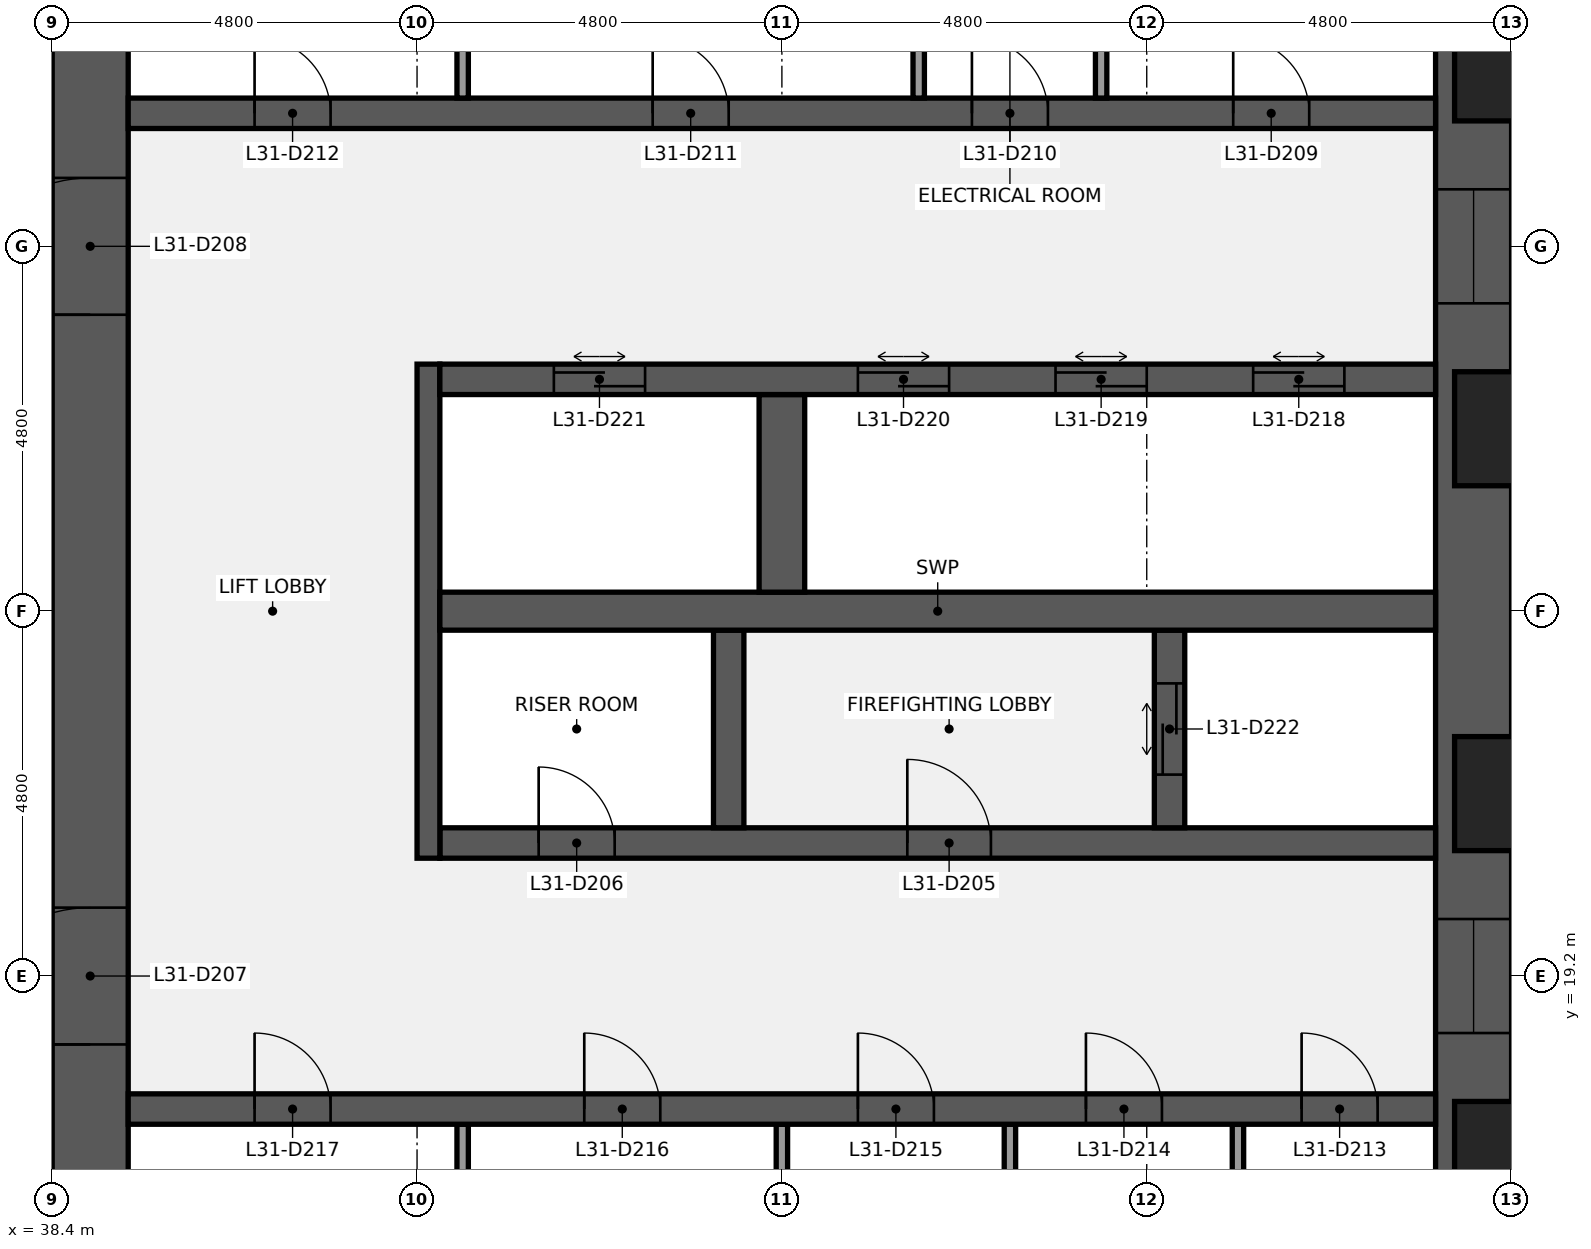
"""IFC4 building model, lengths in metres.
Left out: names, types, materials, properties, quantities, classifications, styles, units other than length and angle.
Written with IfcOpenShell. Run it as: python <this file> out.ifc"""

import sys

from ifc_helpers import new_model, si_unit, direction, frame, frame_2d, origin, place, context, subcontext, project, spatial, rectangle, extrude, element, fill, save


model = new_model("IFC4")
c1 = context("Model", 3, precision=1e-05, world=origin(), true_north=direction((0.0, 1.0)))
c2 = subcontext(c1, "Body", "Model", "MODEL_VIEW")
j1 = project(units=[si_unit("LENGTHUNIT", "METRE"), si_unit("PLANEANGLEUNIT", "RADIAN")], contexts=[c1])
p1 = place(None, origin())
s1 = spatial("IfcSite", under=j1, at=p1, CompositionType="ELEMENT")
p2 = place(p1, origin())
s2 = spatial("IfcBuilding", under=s1, at=p2, CompositionType="ELEMENT")
p3 = place(p2, frame((0.0, 0.0, 144.1)))
s3 = spatial("IfcBuildingStorey", under=s2, at=p3, CompositionType="ELEMENT", Elevation=144.1)
p4 = place(p3, frame((57.1, 38.4, 0.0), z_axis=(0.0, 0.0, 1.0), x_axis=(0.0, -1.0, 0.0)))
e1 = element("IfcWall", 1, at=p4, inside=s3, PredefinedType="SHEAR", context=c2, shape_type="SweptSolid", body=[
    extrude(rectangle(XDim=28.8, YDim=1.0, at=frame_2d((14.4, 0.0))), origin(), (0.0, 0.0, 1.0), 3.84),
])
p5 = place(p4, frame((18.45, 0.0, 0.9)))
e2 = element("IfcOpeningElement", 2, at=p5, cuts=e1, PredefinedType="OPENING", context=c2, shape_type="SweptSolid", body=[
    extrude(rectangle(XDim=1.5, YDim=1.5, at=frame_2d((0.75, 0.75))), frame((0.0, 0.51, 0.0), z_axis=(0.0, -1.0, 0.0), x_axis=(1.0, 0.0, 0.0)), (0.0, 0.0, 1.0), 1.02),
])
p6 = place(p4, frame((8.85, 0.0, 0.9)))
e3 = element("IfcOpeningElement", 3, at=p6, cuts=e1, PredefinedType="OPENING", context=c2, shape_type="SweptSolid", body=[
    extrude(rectangle(XDim=1.5, YDim=1.5, at=frame_2d((0.75, 0.75))), frame((0.0, 0.51, 0.0), z_axis=(0.0, -1.0, 0.0), x_axis=(1.0, 0.0, 0.0)), (0.0, 0.0, 1.0), 1.02),
])
p7 = place(p3, frame((38.9, 9.6, 0.0), z_axis=(0.0, 0.0, 1.0), x_axis=(0.0, 1.0, 0.0)))
e4 = element("IfcWall", 4, at=p7, inside=s3, PredefinedType="SHEAR", context=c2, shape_type="SweptSolid", body=[
    extrude(rectangle(XDim=28.8, YDim=1.0, at=frame_2d((14.4, 0.0))), origin(), (0.0, 0.0, 1.0), 3.84),
])
p8 = place(p7, frame((8.7, 0.0, 0.0)))
e5 = element("IfcOpeningElement", 5, at=p8, cuts=e4, PredefinedType="OPENING", context=c2, shape_type="SweptSolid", body=[
    extrude(rectangle(XDim=1.8, YDim=2.1, at=frame_2d((0.9, 1.05))), frame((0.0, 0.51, 0.0), z_axis=(0.0, -1.0, 0.0), x_axis=(1.0, 0.0, 0.0)), (0.0, 0.0, 1.0), 1.02),
])
p9 = place(p7, frame((18.3, 0.0, 0.0)))
e6 = element("IfcOpeningElement", 6, at=p9, cuts=e4, PredefinedType="OPENING", context=c2, shape_type="SweptSolid", body=[
    extrude(rectangle(XDim=1.8, YDim=2.1, at=frame_2d((0.9, 1.05))), frame((0.0, 0.51, 0.0), z_axis=(0.0, -1.0, 0.0), x_axis=(1.0, 0.0, 0.0)), (0.0, 0.0, 1.0), 1.02),
])
for number, where, z_axis, x_axis in (
    (7, (54.0, 14.65, 0.0), (0.0, 0.0, 1.0), (0.0, 1.0, 0.0)),
    (8, (51.0, 14.65, 0.0), (0.0, 0.0, 1.0), (0.0, 1.0, 0.0)),
    (9, (48.0, 14.65, 0.0), (0.0, 0.0, 1.0), (0.0, 1.0, 0.0)),
    (10, (43.8, 14.65, 0.0), (0.0, 0.0, 1.0), (0.0, 1.0, 0.0)),
):
    element("IfcWall", number, at=place(p3, frame(where, z_axis=z_axis, x_axis=x_axis)), inside=s3, PredefinedType="PARTITIONING", context=c2, shape_type="SweptSolid", body=[
        extrude(rectangle(XDim=2.6, YDim=0.15, at=frame_2d((1.3, 0.0))), origin(), (0.0, 0.0, 1.0), 3.84),
    ])
p10 = place(p3, frame((39.4, 17.45, 0.0), z_axis=(0.0, 0.0, 1.0), x_axis=(1.0, 0.0, 0.0)))
e11 = element("IfcWall", 11, at=p10, inside=s3, PredefinedType="SHEAR", context=c2, shape_type="SweptSolid", body=[
    extrude(rectangle(XDim=17.2, YDim=0.4, at=frame_2d((8.6, 0.0))), origin(), (0.0, 0.0, 1.0), 3.84),
])
p11 = place(p10, frame((15.438, 0.0, 0.0)))
e12 = element("IfcOpeningElement", 12, at=p11, cuts=e11, PredefinedType="OPENING", context=c2, shape_type="SweptSolid", body=[
    extrude(rectangle(XDim=1.0, YDim=2.1, at=frame_2d((0.5, 1.05))), frame((0.0, 0.21, 0.0), z_axis=(0.0, -1.0, 0.0), x_axis=(1.0, 0.0, 0.0)), (0.0, 0.0, 1.0), 0.42),
])
p12 = place(p10, frame((12.6, 0.0, 0.0)))
e13 = element("IfcOpeningElement", 13, at=p12, cuts=e11, PredefinedType="OPENING", context=c2, shape_type="SweptSolid", body=[
    extrude(rectangle(XDim=1.0, YDim=2.1, at=frame_2d((0.5, 1.05))), frame((0.0, 0.21, 0.0), z_axis=(0.0, -1.0, 0.0), x_axis=(1.0, 0.0, 0.0)), (0.0, 0.0, 1.0), 0.42),
])
p13 = place(p10, frame((9.6, 0.0, 0.0)))
e14 = element("IfcOpeningElement", 14, at=p13, cuts=e11, PredefinedType="OPENING", context=c2, shape_type="SweptSolid", body=[
    extrude(rectangle(XDim=1.0, YDim=2.1, at=frame_2d((0.5, 1.05))), frame((0.0, 0.21, 0.0), z_axis=(0.0, -1.0, 0.0), x_axis=(1.0, 0.0, 0.0)), (0.0, 0.0, 1.0), 0.42),
])
p14 = place(p10, frame((6.0, 0.0, 0.0)))
e15 = element("IfcOpeningElement", 15, at=p14, cuts=e11, PredefinedType="OPENING", context=c2, shape_type="SweptSolid", body=[
    extrude(rectangle(XDim=1.0, YDim=2.1, at=frame_2d((0.5, 1.05))), frame((0.0, 0.21, 0.0), z_axis=(0.0, -1.0, 0.0), x_axis=(1.0, 0.0, 0.0)), (0.0, 0.0, 1.0), 0.42),
])
p15 = place(p10, frame((1.663, 0.0, 0.0)))
e16 = element("IfcOpeningElement", 16, at=p15, cuts=e11, PredefinedType="OPENING", context=c2, shape_type="SweptSolid", body=[
    extrude(rectangle(XDim=1.0, YDim=2.1, at=frame_2d((0.5, 1.05))), frame((0.0, 0.21, 0.0), z_axis=(0.0, -1.0, 0.0), x_axis=(1.0, 0.0, 0.0)), (0.0, 0.0, 1.0), 0.42),
])
p16 = place(p3, frame((43.5, 20.95, 0.0), z_axis=(0.0, 0.0, 1.0), x_axis=(1.0, 0.0, 0.0)))
e17 = element("IfcWall", 17, at=p16, inside=s3, PredefinedType="SHEAR", context=c2, shape_type="SweptSolid", body=[
    extrude(rectangle(XDim=13.1, YDim=0.4, at=frame_2d((6.55, 0.0))), origin(), (0.0, 0.0, 1.0), 3.84),
])
p17 = place(p16, frame((6.15, 0.0, 0.0)))
e18 = element("IfcOpeningElement", 18, at=p17, cuts=e17, PredefinedType="OPENING", context=c2, shape_type="SweptSolid", body=[
    extrude(rectangle(XDim=1.1, YDim=2.1, at=frame_2d((0.55, 1.05))), frame((0.0, 0.21, 0.0), z_axis=(0.0, -1.0, 0.0), x_axis=(1.0, 0.0, 0.0)), (0.0, 0.0, 1.0), 0.42),
])
p18 = place(p16, frame((1.3, 0.0, 0.0)))
e19 = element("IfcOpeningElement", 19, at=p18, cuts=e17, PredefinedType="OPENING", context=c2, shape_type="SweptSolid", body=[
    extrude(rectangle(XDim=1.0, YDim=2.1, at=frame_2d((0.5, 1.05))), frame((0.0, 0.21, 0.0), z_axis=(0.0, -1.0, 0.0), x_axis=(1.0, 0.0, 0.0)), (0.0, 0.0, 1.0), 0.42),
])
p19 = place(p3, frame((43.35, 20.75, 0.0), z_axis=(0.0, 0.0, 1.0), x_axis=(0.0, 1.0, 0.0)))
e20 = element("IfcWall", 20, at=p19, inside=s3, PredefinedType="SHEAR", context=c2, shape_type="SweptSolid", body=[
    extrude(rectangle(XDim=6.5, YDim=0.3, at=frame_2d((3.25, 0.0))), origin(), (0.0, 0.0, 1.0), 3.84),
])
p20 = place(p3, frame((53.1, 21.15, 0.0), z_axis=(0.0, 0.0, 1.0), x_axis=(0.0, 1.0, 0.0)))
e21 = element("IfcWall", 21, at=p20, inside=s3, PredefinedType="SHEAR", context=c2, shape_type="SweptSolid", body=[
    extrude(rectangle(XDim=2.6, YDim=0.4, at=frame_2d((1.3, 0.0))), origin(), (0.0, 0.0, 1.0), 3.84),
])
p21 = place(p20, frame((0.7, 0.0, 0.0)))
e22 = element("IfcOpeningElement", 22, at=p21, cuts=e21, PredefinedType="OPENING", context=c2, shape_type="SweptSolid", body=[
    extrude(rectangle(XDim=1.2, YDim=2.1, at=frame_2d((0.6, 1.05))), frame((0.0, 0.21, 0.0), z_axis=(0.0, -1.0, 0.0), x_axis=(1.0, 0.0, 0.0)), (0.0, 0.0, 1.0), 0.42),
])
p22 = place(p3, frame((47.3, 21.15, 0.0), z_axis=(0.0, 0.0, 1.0), x_axis=(0.0, 1.0, 0.0)))
e23 = element("IfcWall", 23, at=p22, inside=s3, PredefinedType="SHEAR", context=c2, shape_type="SweptSolid", body=[
    extrude(rectangle(XDim=2.6, YDim=0.4, at=frame_2d((1.3, 0.0))), origin(), (0.0, 0.0, 1.0), 3.84),
])
p23 = place(p3, frame((43.5, 24.0, 0.0), z_axis=(0.0, 0.0, 1.0), x_axis=(1.0, 0.0, 0.0)))
e24 = element("IfcWall", 24, at=p23, inside=s3, PredefinedType="SHEAR", context=c2, shape_type="SweptSolid", body=[
    extrude(rectangle(XDim=13.1, YDim=0.5, at=frame_2d((6.55, 0.0))), origin(), (0.0, 0.0, 1.0), 3.84),
])
p24 = place(p3, frame((48.0, 24.25, 0.0), z_axis=(0.0, 0.0, 1.0), x_axis=(0.0, 1.0, 0.0)))
e25 = element("IfcWall", 25, at=p24, inside=s3, PredefinedType="SHEAR", context=c2, shape_type="SweptSolid", body=[
    extrude(rectangle(XDim=2.6, YDim=0.6, at=frame_2d((1.3, 0.0))), origin(), (0.0, 0.0, 1.0), 3.84),
])
p25 = place(p3, frame((43.5, 27.05, 0.0), z_axis=(0.0, 0.0, 1.0), x_axis=(1.0, 0.0, 0.0)))
e26 = element("IfcWall", 26, at=p25, inside=s3, PredefinedType="SHEAR", context=c2, shape_type="SweptSolid", body=[
    extrude(rectangle(XDim=13.1, YDim=0.4, at=frame_2d((6.55, 0.0))), origin(), (0.0, 0.0, 1.0), 3.84),
])
p26 = place(p25, frame((10.7, 0.0, 0.0)))
e27 = element("IfcOpeningElement", 27, at=p26, cuts=e26, PredefinedType="OPENING", context=c2, shape_type="SweptSolid", body=[
    extrude(rectangle(XDim=1.2, YDim=2.1, at=frame_2d((0.6, 1.05))), frame((0.0, 0.21, 0.0), z_axis=(0.0, -1.0, 0.0), x_axis=(1.0, 0.0, 0.0)), (0.0, 0.0, 1.0), 0.42),
])
p27 = place(p25, frame((8.1, 0.0, 0.0)))
e28 = element("IfcOpeningElement", 28, at=p27, cuts=e26, PredefinedType="OPENING", context=c2, shape_type="SweptSolid", body=[
    extrude(rectangle(XDim=1.2, YDim=2.1, at=frame_2d((0.6, 1.05))), frame((0.0, 0.21, 0.0), z_axis=(0.0, -1.0, 0.0), x_axis=(1.0, 0.0, 0.0)), (0.0, 0.0, 1.0), 0.42),
])
p28 = place(p25, frame((5.5, 0.0, 0.0)))
e29 = element("IfcOpeningElement", 29, at=p28, cuts=e26, PredefinedType="OPENING", context=c2, shape_type="SweptSolid", body=[
    extrude(rectangle(XDim=1.2, YDim=2.1, at=frame_2d((0.6, 1.05))), frame((0.0, 0.21, 0.0), z_axis=(0.0, -1.0, 0.0), x_axis=(1.0, 0.0, 0.0)), (0.0, 0.0, 1.0), 0.42),
])
p29 = place(p25, frame((1.5, 0.0, 0.0)))
e30 = element("IfcOpeningElement", 30, at=p29, cuts=e26, PredefinedType="OPENING", context=c2, shape_type="SweptSolid", body=[
    extrude(rectangle(XDim=1.2, YDim=2.1, at=frame_2d((0.6, 1.05))), frame((0.0, 0.21, 0.0), z_axis=(0.0, -1.0, 0.0), x_axis=(1.0, 0.0, 0.0)), (0.0, 0.0, 1.0), 0.42),
])
p30 = place(p3, frame((39.4, 30.55, 0.0), z_axis=(0.0, 0.0, 1.0), x_axis=(1.0, 0.0, 0.0)))
e31 = element("IfcWall", 31, at=p30, inside=s3, PredefinedType="SHEAR", context=c2, shape_type="SweptSolid", body=[
    extrude(rectangle(XDim=17.2, YDim=0.4, at=frame_2d((8.6, 0.0))), origin(), (0.0, 0.0, 1.0), 3.84),
])
p31 = place(p30, frame((14.538, 0.0, 0.0)))
e32 = element("IfcOpeningElement", 32, at=p31, cuts=e31, PredefinedType="OPENING", context=c2, shape_type="SweptSolid", body=[
    extrude(rectangle(XDim=1.0, YDim=2.1, at=frame_2d((0.5, 1.05))), frame((0.0, 0.21, 0.0), z_axis=(0.0, -1.0, 0.0), x_axis=(1.0, 0.0, 0.0)), (0.0, 0.0, 1.0), 0.42),
])
p32 = place(p30, frame((11.1, 0.0, 0.0)))
e33 = element("IfcOpeningElement", 33, at=p32, cuts=e31, PredefinedType="OPENING", context=c2, shape_type="SweptSolid", body=[
    extrude(rectangle(XDim=1.0, YDim=2.1, at=frame_2d((0.5, 1.05))), frame((0.0, 0.21, 0.0), z_axis=(0.0, -1.0, 0.0), x_axis=(1.0, 0.0, 0.0)), (0.0, 0.0, 1.0), 0.42),
])
p33 = place(p30, frame((6.9, 0.0, 0.0)))
e34 = element("IfcOpeningElement", 34, at=p33, cuts=e31, PredefinedType="OPENING", context=c2, shape_type="SweptSolid", body=[
    extrude(rectangle(XDim=1.0, YDim=2.1, at=frame_2d((0.5, 1.05))), frame((0.0, 0.21, 0.0), z_axis=(0.0, -1.0, 0.0), x_axis=(1.0, 0.0, 0.0)), (0.0, 0.0, 1.0), 0.42),
])
p34 = place(p30, frame((1.663, 0.0, 0.0)))
e35 = element("IfcOpeningElement", 35, at=p34, cuts=e31, PredefinedType="OPENING", context=c2, shape_type="SweptSolid", body=[
    extrude(rectangle(XDim=1.0, YDim=2.1, at=frame_2d((0.5, 1.05))), frame((0.0, 0.21, 0.0), z_axis=(0.0, -1.0, 0.0), x_axis=(1.0, 0.0, 0.0)), (0.0, 0.0, 1.0), 0.42),
])
for number, where, z_axis, x_axis in (
    (36, (52.2, 30.75, 0.0), (0.0, 0.0, 1.0), (0.0, 1.0, 0.0)),
    (37, (49.8, 30.75, 0.0), (0.0, 0.0, 1.0), (0.0, 1.0, 0.0)),
    (38, (43.8, 30.75, 0.0), (0.0, 0.0, 1.0), (0.0, 1.0, 0.0)),
):
    element("IfcWall", number, at=place(p3, frame(where, z_axis=z_axis, x_axis=x_axis)), inside=s3, PredefinedType="PARTITIONING", context=c2, shape_type="SweptSolid", body=[
        extrude(rectangle(XDim=2.6, YDim=0.15, at=frame_2d((1.3, 0.0))), origin(), (0.0, 0.0, 1.0), 3.84),
    ])
p35 = place(p17, origin())
e39 = element("IfcDoor", 39, at=p35, inside=s3, OperationType="SINGLE_SWING_LEFT", PredefinedType="DOOR", context=c2, shape_type="SweptSolid", body=[
    extrude(rectangle(XDim=1.1, YDim=2.1, at=frame_2d((0.55, 1.05))), frame((0.0, 0.025, 0.0), z_axis=(0.0, -1.0, 0.0), x_axis=(1.0, 0.0, 0.0)), (0.0, 0.0, 1.0), 0.05),
])
fill(e18, e39)
p36 = place(p18, origin())
e40 = element("IfcDoor", 40, at=p36, inside=s3, OperationType="SINGLE_SWING_LEFT", PredefinedType="DOOR", context=c2, shape_type="SweptSolid", body=[
    extrude(rectangle(XDim=1.0, YDim=2.1, at=frame_2d((0.5, 1.05))), frame((0.0, 0.025, 0.0), z_axis=(0.0, -1.0, 0.0), x_axis=(1.0, 0.0, 0.0)), (0.0, 0.0, 1.0), 0.05),
])
fill(e19, e40)
p37 = place(p8, origin())
e41 = element("IfcDoor", 41, at=p37, inside=s3, OperationType="DOUBLE_DOOR_SINGLE_SWING", PredefinedType="DOOR", context=c2, shape_type="SweptSolid", body=[
    extrude(rectangle(XDim=1.8, YDim=2.1, at=frame_2d((0.9, 1.05))), frame((0.0, 0.025, 0.0), z_axis=(0.0, -1.0, 0.0), x_axis=(1.0, 0.0, 0.0)), (0.0, 0.0, 1.0), 0.05),
])
fill(e5, e41)
p38 = place(p9, origin())
e42 = element("IfcDoor", 42, at=p38, inside=s3, OperationType="DOUBLE_DOOR_SINGLE_SWING", PredefinedType="DOOR", context=c2, shape_type="SweptSolid", body=[
    extrude(rectangle(XDim=1.8, YDim=2.1, at=frame_2d((0.9, 1.05))), frame((0.0, 0.025, 0.0), z_axis=(0.0, -1.0, 0.0), x_axis=(1.0, 0.0, 0.0)), (0.0, 0.0, 1.0), 0.05),
])
fill(e6, e42)
p39 = place(p31, origin())
e43 = element("IfcDoor", 43, at=p39, inside=s3, OperationType="SINGLE_SWING_LEFT", PredefinedType="DOOR", context=c2, shape_type="SweptSolid", body=[
    extrude(rectangle(XDim=1.0, YDim=2.1, at=frame_2d((0.5, 1.05))), frame((0.0, 0.025, 0.0), z_axis=(0.0, -1.0, 0.0), x_axis=(1.0, 0.0, 0.0)), (0.0, 0.0, 1.0), 0.05),
])
fill(e32, e43)
p40 = place(p32, origin())
e44 = element("IfcDoor", 44, at=p40, inside=s3, OperationType="SINGLE_SWING_LEFT", PredefinedType="DOOR", context=c2, shape_type="SweptSolid", body=[
    extrude(rectangle(XDim=1.0, YDim=2.1, at=frame_2d((0.5, 1.05))), frame((0.0, 0.025, 0.0), z_axis=(0.0, -1.0, 0.0), x_axis=(1.0, 0.0, 0.0)), (0.0, 0.0, 1.0), 0.05),
])
fill(e33, e44)
p41 = place(p33, origin())
e45 = element("IfcDoor", 45, at=p41, inside=s3, OperationType="SINGLE_SWING_LEFT", PredefinedType="DOOR", context=c2, shape_type="SweptSolid", body=[
    extrude(rectangle(XDim=1.0, YDim=2.1, at=frame_2d((0.5, 1.05))), frame((0.0, 0.025, 0.0), z_axis=(0.0, -1.0, 0.0), x_axis=(1.0, 0.0, 0.0)), (0.0, 0.0, 1.0), 0.05),
])
fill(e34, e45)
p42 = place(p34, origin())
e46 = element("IfcDoor", 46, at=p42, inside=s3, OperationType="SINGLE_SWING_LEFT", PredefinedType="DOOR", context=c2, shape_type="SweptSolid", body=[
    extrude(rectangle(XDim=1.0, YDim=2.1, at=frame_2d((0.5, 1.05))), frame((0.0, 0.025, 0.0), z_axis=(0.0, -1.0, 0.0), x_axis=(1.0, 0.0, 0.0)), (0.0, 0.0, 1.0), 0.05),
])
fill(e35, e46)
p43 = place(p11, origin())
e47 = element("IfcDoor", 47, at=p43, inside=s3, OperationType="SINGLE_SWING_LEFT", PredefinedType="DOOR", context=c2, shape_type="SweptSolid", body=[
    extrude(rectangle(XDim=1.0, YDim=2.1, at=frame_2d((0.5, 1.05))), frame((0.0, 0.025, 0.0), z_axis=(0.0, -1.0, 0.0), x_axis=(1.0, 0.0, 0.0)), (0.0, 0.0, 1.0), 0.05),
])
fill(e12, e47)
p44 = place(p12, origin())
e48 = element("IfcDoor", 48, at=p44, inside=s3, OperationType="SINGLE_SWING_LEFT", PredefinedType="DOOR", context=c2, shape_type="SweptSolid", body=[
    extrude(rectangle(XDim=1.0, YDim=2.1, at=frame_2d((0.5, 1.05))), frame((0.0, 0.025, 0.0), z_axis=(0.0, -1.0, 0.0), x_axis=(1.0, 0.0, 0.0)), (0.0, 0.0, 1.0), 0.05),
])
fill(e13, e48)
p45 = place(p13, origin())
e49 = element("IfcDoor", 49, at=p45, inside=s3, OperationType="SINGLE_SWING_LEFT", PredefinedType="DOOR", context=c2, shape_type="SweptSolid", body=[
    extrude(rectangle(XDim=1.0, YDim=2.1, at=frame_2d((0.5, 1.05))), frame((0.0, 0.025, 0.0), z_axis=(0.0, -1.0, 0.0), x_axis=(1.0, 0.0, 0.0)), (0.0, 0.0, 1.0), 0.05),
])
fill(e14, e49)
p46 = place(p14, origin())
e50 = element("IfcDoor", 50, at=p46, inside=s3, OperationType="SINGLE_SWING_LEFT", PredefinedType="DOOR", context=c2, shape_type="SweptSolid", body=[
    extrude(rectangle(XDim=1.0, YDim=2.1, at=frame_2d((0.5, 1.05))), frame((0.0, 0.025, 0.0), z_axis=(0.0, -1.0, 0.0), x_axis=(1.0, 0.0, 0.0)), (0.0, 0.0, 1.0), 0.05),
])
fill(e15, e50)
p47 = place(p15, origin())
e51 = element("IfcDoor", 51, at=p47, inside=s3, OperationType="SINGLE_SWING_LEFT", PredefinedType="DOOR", context=c2, shape_type="SweptSolid", body=[
    extrude(rectangle(XDim=1.0, YDim=2.1, at=frame_2d((0.5, 1.05))), frame((0.0, 0.025, 0.0), z_axis=(0.0, -1.0, 0.0), x_axis=(1.0, 0.0, 0.0)), (0.0, 0.0, 1.0), 0.05),
])
fill(e16, e51)
p48 = place(p26, origin())
e52 = element("IfcDoor", 52, at=p48, inside=s3, OperationType="DOUBLE_DOOR_SLIDING", PredefinedType="DOOR", context=c2, shape_type="SweptSolid", body=[
    extrude(rectangle(XDim=1.2, YDim=2.1, at=frame_2d((0.6, 1.05))), frame((0.0, 0.025, 0.0), z_axis=(0.0, -1.0, 0.0), x_axis=(1.0, 0.0, 0.0)), (0.0, 0.0, 1.0), 0.05),
])
fill(e27, e52)
p49 = place(p27, origin())
e53 = element("IfcDoor", 53, at=p49, inside=s3, OperationType="DOUBLE_DOOR_SLIDING", PredefinedType="DOOR", context=c2, shape_type="SweptSolid", body=[
    extrude(rectangle(XDim=1.2, YDim=2.1, at=frame_2d((0.6, 1.05))), frame((0.0, 0.025, 0.0), z_axis=(0.0, -1.0, 0.0), x_axis=(1.0, 0.0, 0.0)), (0.0, 0.0, 1.0), 0.05),
])
fill(e28, e53)
p50 = place(p28, origin())
e54 = element("IfcDoor", 54, at=p50, inside=s3, OperationType="DOUBLE_DOOR_SLIDING", PredefinedType="DOOR", context=c2, shape_type="SweptSolid", body=[
    extrude(rectangle(XDim=1.2, YDim=2.1, at=frame_2d((0.6, 1.05))), frame((0.0, 0.025, 0.0), z_axis=(0.0, -1.0, 0.0), x_axis=(1.0, 0.0, 0.0)), (0.0, 0.0, 1.0), 0.05),
])
fill(e29, e54)
p51 = place(p29, origin())
e55 = element("IfcDoor", 55, at=p51, inside=s3, OperationType="DOUBLE_DOOR_SLIDING", PredefinedType="DOOR", context=c2, shape_type="SweptSolid", body=[
    extrude(rectangle(XDim=1.2, YDim=2.1, at=frame_2d((0.6, 1.05))), frame((0.0, 0.025, 0.0), z_axis=(0.0, -1.0, 0.0), x_axis=(1.0, 0.0, 0.0)), (0.0, 0.0, 1.0), 0.05),
])
fill(e30, e55)
p52 = place(p21, origin())
e56 = element("IfcDoor", 56, at=p52, inside=s3, OperationType="DOUBLE_DOOR_SLIDING", PredefinedType="DOOR", context=c2, shape_type="SweptSolid", body=[
    extrude(rectangle(XDim=1.2, YDim=2.1, at=frame_2d((0.6, 1.05))), frame((0.0, 0.025, 0.0), z_axis=(0.0, -1.0, 0.0), x_axis=(1.0, 0.0, 0.0)), (0.0, 0.0, 1.0), 0.05),
])
fill(e22, e56)
p53 = place(p5, origin())
e57 = element("IfcWindow", 57, at=p53, inside=s3, PartitioningType="SINGLE_PANEL", PredefinedType="WINDOW", context=c2, shape_type="SweptSolid", body=[
    extrude(rectangle(XDim=1.5, YDim=1.5, at=frame_2d((0.75, 0.75))), frame((0.0, 0.03, 0.0), z_axis=(0.0, -1.0, 0.0), x_axis=(1.0, 0.0, 0.0)), (0.0, 0.0, 1.0), 0.06),
])
fill(e2, e57)
p54 = place(p6, origin())
e58 = element("IfcWindow", 58, at=p54, inside=s3, PartitioningType="SINGLE_PANEL", PredefinedType="WINDOW", context=c2, shape_type="SweptSolid", body=[
    extrude(rectangle(XDim=1.5, YDim=1.5, at=frame_2d((0.75, 0.75))), frame((0.0, 0.03, 0.0), z_axis=(0.0, -1.0, 0.0), x_axis=(1.0, 0.0, 0.0)), (0.0, 0.0, 1.0), 0.06),
])
fill(e3, e58)
save(model, sys.argv[1])
